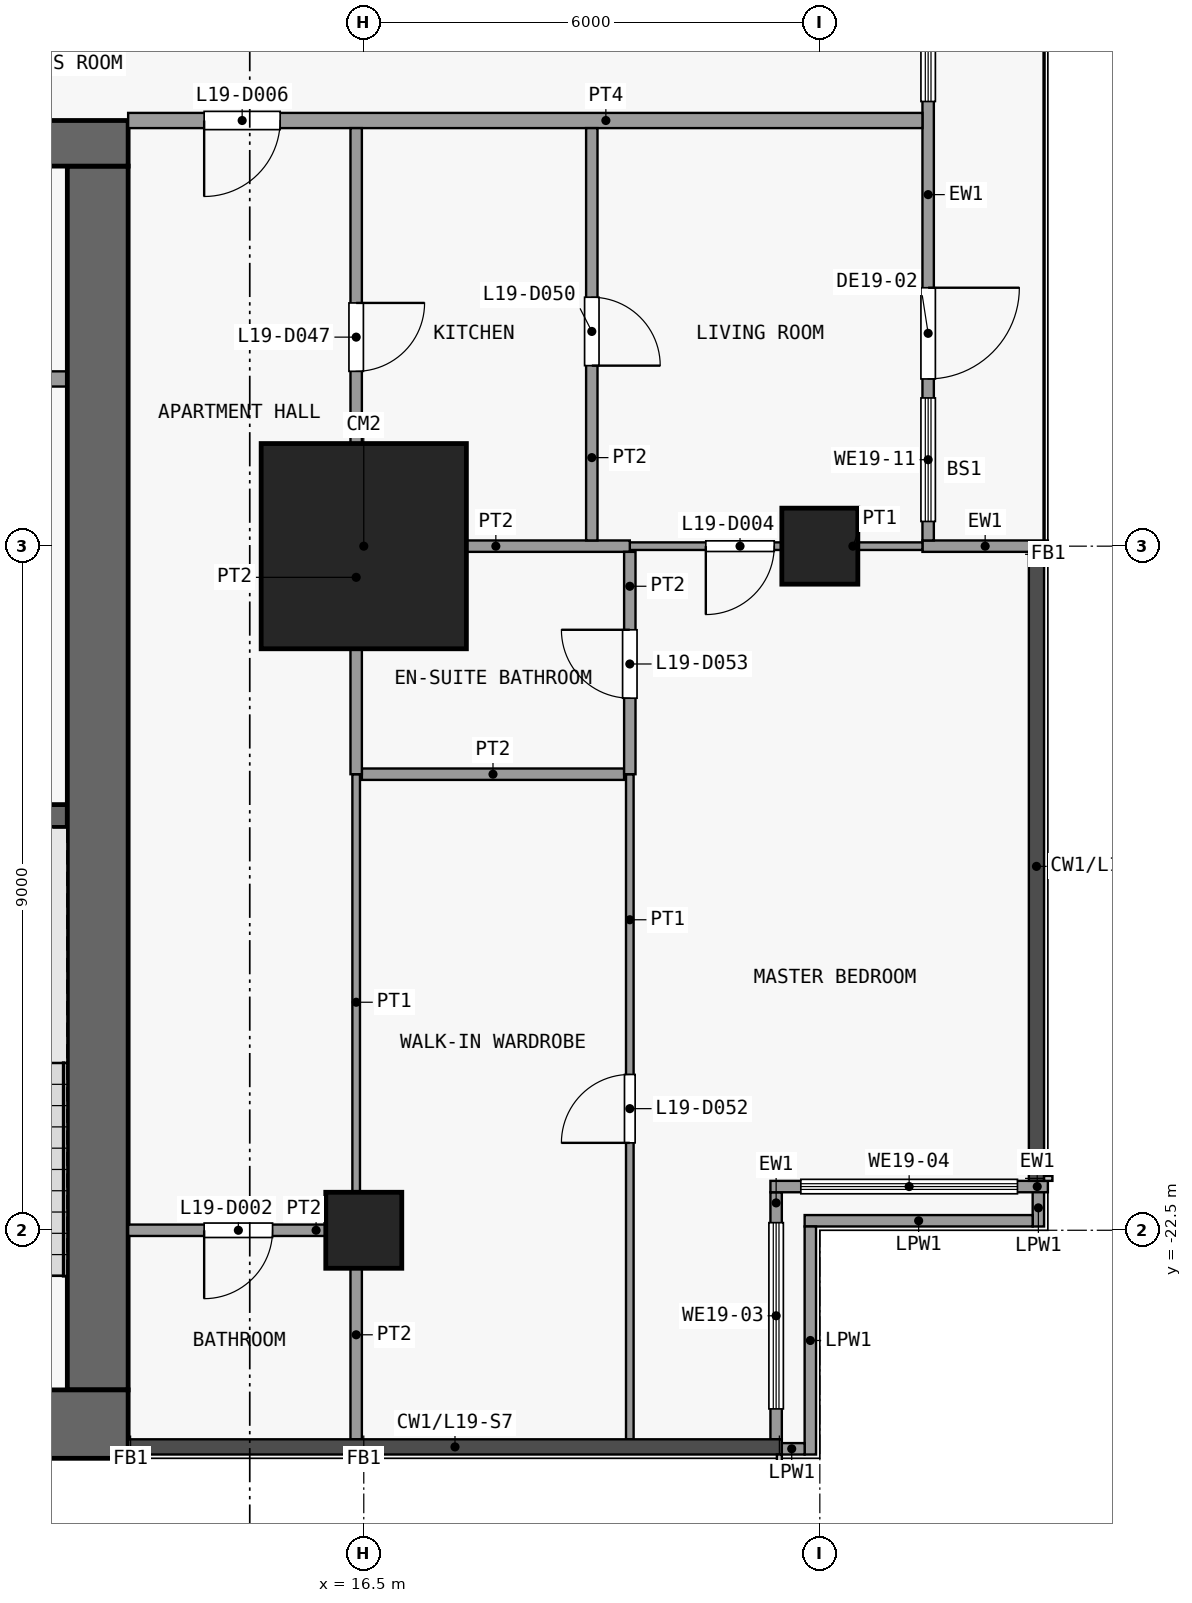
"""IFC4 building model, lengths in metres.
Left out: names, types, materials, properties, quantities, classifications, styles, units other than length and angle.
Written with IfcOpenShell. Run it as: python <this file> out.ifc"""

import sys

from ifc_helpers import new_model, si_unit, direction, frame, frame_2d, origin, origin_2d, place, context, subcontext, project, spatial, rectangle, extrude, element, fill, save


model = new_model("IFC4")
c1 = context("Model", 3, precision=1e-05, world=origin(), true_north=direction((0.0, 1.0)))
c2 = subcontext(c1, "Body", "Model", "MODEL_VIEW")
j1 = project(units=[si_unit("LENGTHUNIT", "METRE"), si_unit("PLANEANGLEUNIT", "RADIAN")], contexts=[c1])
p1 = place(None, origin())
s1 = spatial("IfcSite", under=j1, at=p1, CompositionType="ELEMENT")
p2 = place(p1, origin())
s2 = spatial("IfcBuilding", under=s1, at=p2, CompositionType="ELEMENT")
p3 = place(p2, frame((0.0, 0.0, 81.1)))
s3 = spatial("IfcBuildingStorey", under=s2, at=p3, CompositionType="ELEMENT", Elevation=81.1)
p4 = place(p3, frame((16.5, -22.5, 0.0), z_axis=(0.0, 0.0, 1.0), x_axis=(1.0, 0.0, 0.0)))
e1 = element("IfcColumn", 1, at=p4, inside=s3, PredefinedType="COLUMN", context=c2, shape_type="SweptSolid", body=[
    extrude(rectangle(XDim=1.0, YDim=1.0, at=origin_2d()), origin(), (0.0, 0.0, 1.0), 3.6),
])
p5 = place(p3, frame((16.5, -13.5, 0.0), z_axis=(0.0, 0.0, 1.0), x_axis=(1.0, 0.0, 0.0)))
e2 = element("IfcColumn", 2, at=p5, inside=s3, PredefinedType="COLUMN", context=c2, shape_type="SweptSolid", body=[
    extrude(rectangle(XDim=2.7, YDim=2.7, at=origin_2d()), origin(), (0.0, 0.0, 1.0), 3.6),
])
p6 = place(p3, frame((22.5, -13.5, 0.0), z_axis=(0.0, 0.0, 1.0), x_axis=(1.0, 0.0, 0.0)))
e3 = element("IfcColumn", 3, at=p6, inside=s3, PredefinedType="COLUMN", context=c2, shape_type="SweptSolid", body=[
    extrude(rectangle(XDim=1.0, YDim=1.0, at=origin_2d()), origin(), (0.0, 0.0, 1.0), 3.6),
])
p7 = place(p3, frame((-13.4, -25.05, 0.0), z_axis=(0.0, 0.0, 1.0), x_axis=(1.0, 0.0, 0.0)))
e4 = element("IfcWall", 4, at=p7, inside=s3, PredefinedType="SHEAR", context=c2, shape_type="SweptSolid", body=[
    extrude(rectangle(XDim=26.8, YDim=0.9, at=frame_2d((13.4, 0.0))), origin(), (0.0, 0.0, 1.0), 3.3),
])
p8 = place(p3, frame((-13.4, -8.2, 0.0), z_axis=(0.0, 0.0, 1.0), x_axis=(1.0, 0.0, 0.0)))
e5 = element("IfcWall", 5, at=p8, inside=s3, PredefinedType="SHEAR", context=c2, shape_type="SweptSolid", body=[
    extrude(rectangle(XDim=26.8, YDim=0.6, at=frame_2d((13.4, 0.0))), origin(), (0.0, 0.0, 1.0), 3.3),
])
p9 = place(p8, frame((7.7, 0.0, 0.0)))
e6 = element("IfcOpeningElement", 6, at=p9, cuts=e5, PredefinedType="OPENING", context=c2, shape_type="SweptSolid", body=[
    extrude(rectangle(XDim=1.8, YDim=2.1, at=frame_2d((0.9, 1.05))), frame((0.0, 0.31, 0.0), z_axis=(0.0, -1.0, 0.0), x_axis=(1.0, 0.0, 0.0)), (0.0, 0.0, 1.0), 0.62),
])
p10 = place(p8, frame((17.3, 0.0, 0.0)))
e7 = element("IfcOpeningElement", 7, at=p10, cuts=e5, PredefinedType="OPENING", context=c2, shape_type="SweptSolid", body=[
    extrude(rectangle(XDim=1.8, YDim=2.1, at=frame_2d((0.9, 1.05))), frame((0.0, 0.31, 0.0), z_axis=(0.0, -1.0, 0.0), x_axis=(1.0, 0.0, 0.0)), (0.0, 0.0, 1.0), 0.62),
])
p11 = place(p8, frame((2.625, 0.0, 0.0)))
e8 = element("IfcOpeningElement", 8, at=p11, cuts=e5, PredefinedType="OPENING", context=c2, shape_type="SweptSolid", body=[
    extrude(rectangle(XDim=0.9, YDim=2.1, at=frame_2d((0.45, 1.05))), frame((0.0, 0.31, 0.0), z_axis=(0.0, -1.0, 0.0), x_axis=(1.0, 0.0, 0.0)), (0.0, 0.0, 1.0), 0.62),
])
p12 = place(p8, frame((23.275, 0.0, 0.0)))
e9 = element("IfcOpeningElement", 9, at=p12, cuts=e5, PredefinedType="OPENING", context=c2, shape_type="SweptSolid", body=[
    extrude(rectangle(XDim=0.9, YDim=2.1, at=frame_2d((0.45, 1.05))), frame((0.0, 0.31, 0.0), z_axis=(0.0, -1.0, 0.0), x_axis=(1.0, 0.0, 0.0)), (0.0, 0.0, 1.0), 0.62),
])
p13 = place(p3, frame((13.0, -24.6, 0.0), z_axis=(0.0, 0.0, 1.0), x_axis=(0.0, 1.0, 0.0)))
e10 = element("IfcWall", 10, at=p13, inside=s3, PredefinedType="SHEAR", context=c2, shape_type="SweptSolid", body=[
    extrude(rectangle(XDim=16.1, YDim=0.8, at=frame_2d((8.05, 0.0))), origin(), (0.0, 0.0, 1.0), 3.3),
])
p14 = place(p3, frame((9.5, -17.05, 0.0), z_axis=(0.0, 0.0, 1.0), x_axis=(1.0, 0.0, 0.0)))
e11 = element("IfcWall", 11, at=p14, inside=s3, PredefinedType="SHEAR", context=c2, shape_type="SweptSolid", body=[
    extrude(rectangle(XDim=3.1, YDim=0.3, at=frame_2d((1.55, 0.0))), origin(), (0.0, 0.0, 1.0), 3.3),
])
p15 = place(p3, frame((11.15, -11.3, 0.0), z_axis=(0.0, 0.0, 1.0), x_axis=(1.0, 0.0, 0.0)))
e12 = element("IfcWall", 12, at=p15, inside=s3, PredefinedType="PARTITIONING", context=c2, shape_type="SweptSolid", body=[
    extrude(rectangle(XDim=1.45, YDim=0.2, at=frame_2d((0.725, 0.0))), origin(), (0.0, 0.0, 1.0), 3.3),
])
p16 = place(p3, frame((21.925, -22.0, 0.0), z_axis=(0.0, 0.0, 1.0), x_axis=(0.0, -1.0, 0.0)))
e13 = element("IfcWall", 13, at=p16, inside=s3, PredefinedType="SOLIDWALL", context=c2, shape_type="SweptSolid", body=[
    extrude(rectangle(XDim=3.25, YDim=0.15, at=frame_2d((1.625, 0.0))), origin(), (0.0, 0.0, 1.0), 3.3),
])
p17 = place(p16, frame((0.4, 0.0, 0.9)))
e14 = element("IfcOpeningElement", 14, at=p17, cuts=e13, PredefinedType="OPENING", context=c2, shape_type="SweptSolid", body=[
    extrude(rectangle(XDim=2.45, YDim=2.4, at=frame_2d((1.225, 1.2))), frame((0.0, 0.085, 0.0), z_axis=(0.0, -1.0, 0.0), x_axis=(1.0, 0.0, 0.0)), (0.0, 0.0, 1.0), 0.17),
])
p18 = place(p3, frame((25.5, -21.925, 0.0), z_axis=(0.0, 0.0, 1.0), x_axis=(-1.0, 0.0, 0.0)))
e15 = element("IfcWall", 15, at=p18, inside=s3, PredefinedType="SOLIDWALL", context=c2, shape_type="SweptSolid", body=[
    extrude(rectangle(XDim=3.65, YDim=0.15, at=frame_2d((1.825, 0.0))), origin(), (0.0, 0.0, 1.0), 3.3),
])
p19 = place(p18, frame((0.4, 0.0, 0.9)))
e16 = element("IfcOpeningElement", 16, at=p19, cuts=e15, PredefinedType="OPENING", context=c2, shape_type="SweptSolid", body=[
    extrude(rectangle(XDim=2.85, YDim=2.4, at=frame_2d((1.425, 1.2))), frame((0.0, 0.085, 0.0), z_axis=(0.0, -1.0, 0.0), x_axis=(1.0, 0.0, 0.0)), (0.0, 0.0, 1.0), 0.17),
])
p20 = place(p3, frame((23.85, -13.5, 0.0), z_axis=(0.0, 0.0, 1.0), x_axis=(1.0, 0.0, 0.0)))
e17 = element("IfcWall", 17, at=p20, inside=s3, PredefinedType="SOLIDWALL", context=c2, shape_type="SweptSolid", body=[
    extrude(rectangle(XDim=1.65, YDim=0.15, at=frame_2d((0.825, 0.0))), origin(), (0.0, 0.0, 1.0), 3.3),
])
p21 = place(p3, frame((23.925, -4.5, 0.0), z_axis=(0.0, 0.0, 1.0), x_axis=(0.0, -1.0, 0.0)))
e18 = element("IfcWall", 18, at=p21, inside=s3, PredefinedType="SOLIDWALL", context=c2, shape_type="SweptSolid", body=[
    extrude(rectangle(XDim=8.925, YDim=0.15, at=frame_2d((4.462, 0.0))), origin(), (0.0, 0.0, 1.0), 3.3),
])
p22 = place(p21, frame((5.6, 0.0, 0.0)))
e19 = element("IfcOpeningElement", 19, at=p22, cuts=e18, PredefinedType="OPENING", context=c2, shape_type="SweptSolid", body=[
    extrude(rectangle(XDim=1.2, YDim=2.4, at=frame_2d((0.6, 1.2))), frame((0.0, 0.085, 0.0), z_axis=(0.0, -1.0, 0.0), x_axis=(1.0, 0.0, 0.0)), (0.0, 0.0, 1.0), 0.17),
])
p23 = place(p21, frame((7.05, 0.0, 0.9)))
e20 = element("IfcOpeningElement", 20, at=p23, cuts=e18, PredefinedType="OPENING", context=c2, shape_type="SweptSolid", body=[
    extrude(rectangle(XDim=1.625, YDim=2.1, at=frame_2d((0.812, 1.05))), frame((0.0, 0.085, 0.0), z_axis=(0.0, -1.0, 0.0), x_axis=(1.0, 0.0, 0.0)), (0.0, 0.0, 1.0), 0.17),
])
p24 = place(p21, frame((1.3, 0.0, 0.9)))
e21 = element("IfcOpeningElement", 21, at=p24, cuts=e18, PredefinedType="OPENING", context=c2, shape_type="SweptSolid", body=[
    extrude(rectangle(XDim=1.85, YDim=2.1, at=frame_2d((0.925, 1.05))), frame((0.0, 0.085, 0.0), z_axis=(0.0, -1.0, 0.0), x_axis=(1.0, 0.0, 0.0)), (0.0, 0.0, 1.0), 0.17),
])
p25 = place(p3, frame((25.375, -21.96, 0.0), z_axis=(0.0, 0.0, 1.0), x_axis=(0.0, -1.0, 0.0)))
e22 = element("IfcWall", 22, at=p25, inside=s3, PredefinedType="PARAPET", context=c2, shape_type="SweptSolid", body=[
    extrude(rectangle(XDim=0.49, YDim=0.15, at=frame_2d((0.245, 0.0))), origin(), (0.0, 0.0, 1.0), 1.15),
])
for number, where, z_axis, x_axis in (
    (23, (25.3, -22.375, 0.0), (0.0, 0.0, 1.0), (-1.0, 0.0, 0.0)),
    (24, (22.375, -22.45, 0.0), (0.0, 0.0, 1.0), (0.0, -1.0, 0.0)),
):
    element("IfcWall", number, at=place(p3, frame(where, z_axis=z_axis, x_axis=x_axis)), inside=s3, PredefinedType="PARAPET", context=c2, shape_type="SweptSolid", body=[
        extrude(rectangle(XDim=3.0, YDim=0.15, at=frame_2d((1.5, 0.0))), origin(), (0.0, 0.0, 1.0), 1.15),
    ])
p26 = place(p3, frame((22.3, -25.375, 0.0), z_axis=(0.0, 0.0, 1.0), x_axis=(-1.0, 0.0, 0.0)))
e25 = element("IfcWall", 25, at=p26, inside=s3, PredefinedType="PARAPET", context=c2, shape_type="SweptSolid", body=[
    extrude(rectangle(XDim=0.34, YDim=0.15, at=frame_2d((0.17, 0.0))), origin(), (0.0, 0.0, 1.0), 1.15),
])
p27 = place(p3, frame((13.4, -22.5, 0.0), z_axis=(0.0, 0.0, 1.0), x_axis=(1.0, 0.0, 0.0)))
e26 = element("IfcWall", 26, at=p27, inside=s3, PredefinedType="PARTITIONING", context=c2, shape_type="SweptSolid", body=[
    extrude(rectangle(XDim=2.925, YDim=0.15, at=frame_2d((1.462, 0.0))), origin(), (0.0, 0.0, 1.0), 3.3),
])
p28 = place(p27, frame((1.0, 0.0, 0.0)))
e27 = element("IfcOpeningElement", 27, at=p28, cuts=e26, PredefinedType="OPENING", context=c2, shape_type="SweptSolid", body=[
    extrude(rectangle(XDim=0.9, YDim=2.1, at=frame_2d((0.45, 1.05))), frame((0.0, 0.085, 0.0), z_axis=(0.0, -1.0, 0.0), x_axis=(1.0, 0.0, 0.0)), (0.0, 0.0, 1.0), 0.17),
])
p29 = place(p3, frame((16.475, -16.5, 0.0), z_axis=(0.0, 0.0, 1.0), x_axis=(1.0, 0.0, 0.0)))
e28 = element("IfcWall", 28, at=p29, inside=s3, PredefinedType="PARTITIONING", context=c2, shape_type="SweptSolid", body=[
    extrude(rectangle(XDim=3.45, YDim=0.15, at=frame_2d((1.725, 0.0))), origin(), (0.0, 0.0, 1.0), 3.3),
])
p30 = place(p3, frame((20.0, -13.5, 0.0), z_axis=(0.0, 0.0, 1.0), x_axis=(1.0, 0.0, 0.0)))
e29 = element("IfcWall", 29, at=p30, inside=s3, PredefinedType="PARTITIONING", context=c2, shape_type="SweptSolid", body=[
    extrude(rectangle(XDim=3.85, YDim=0.1, at=frame_2d((1.925, 0.0))), origin(), (0.0, 0.0, 1.0), 3.3),
])
p31 = place(p30, frame((1.0, 0.0, 0.0)))
e30 = element("IfcOpeningElement", 30, at=p31, cuts=e29, PredefinedType="OPENING", context=c2, shape_type="SweptSolid", body=[
    extrude(rectangle(XDim=0.9, YDim=2.1, at=frame_2d((0.45, 1.05))), frame((0.0, 0.06, 0.0), z_axis=(0.0, -1.0, 0.0), x_axis=(1.0, 0.0, 0.0)), (0.0, 0.0, 1.0), 0.12),
])
p32 = place(p3, frame((16.475, -13.5, 0.0), z_axis=(0.0, 0.0, 1.0), x_axis=(1.0, 0.0, 0.0)))
e31 = element("IfcWall", 31, at=p32, inside=s3, PredefinedType="PARTITIONING", context=c2, shape_type="SweptSolid", body=[
    extrude(rectangle(XDim=3.525, YDim=0.15, at=frame_2d((1.762, 0.0))), origin(), (0.0, 0.0, 1.0), 3.3),
])
p33 = place(p3, frame((13.4, -7.9, 0.0), z_axis=(0.0, 0.0, 1.0), x_axis=(1.0, 0.0, 0.0)))
e32 = element("IfcWall", 32, at=p33, inside=s3, PredefinedType="PARTITIONING", context=c2, shape_type="SweptSolid", body=[
    extrude(rectangle(XDim=10.45, YDim=0.2, at=frame_2d((5.225, 0.0))), origin(), (0.0, 0.0, 1.0), 3.3),
])
p34 = place(p33, frame((1.0, 0.0, 0.0)))
e33 = element("IfcOpeningElement", 33, at=p34, cuts=e32, PredefinedType="OPENING", context=c2, shape_type="SweptSolid", body=[
    extrude(rectangle(XDim=1.0, YDim=2.1, at=frame_2d((0.5, 1.05))), frame((0.0, 0.11, 0.0), z_axis=(0.0, -1.0, 0.0), x_axis=(1.0, 0.0, 0.0)), (0.0, 0.0, 1.0), 0.22),
])
p35 = place(p3, frame((16.4, -22.5, 0.0), z_axis=(0.0, 0.0, 1.0), x_axis=(0.0, 1.0, 0.0)))
e34 = element("IfcWall", 34, at=p35, inside=s3, PredefinedType="PARTITIONING", context=c2, shape_type="SweptSolid", body=[
    extrude(rectangle(XDim=6.0, YDim=0.1, at=frame_2d((3.0, 0.0))), origin(), (0.0, 0.0, 1.0), 3.3),
])
p36 = place(p3, frame((16.4, -25.25, 0.0), z_axis=(0.0, 0.0, 1.0), x_axis=(0.0, 1.0, 0.0)))
e35 = element("IfcWall", 35, at=p36, inside=s3, PredefinedType="PARTITIONING", context=c2, shape_type="SweptSolid", body=[
    extrude(rectangle(XDim=2.75, YDim=0.15, at=frame_2d((1.375, 0.0))), origin(), (0.0, 0.0, 1.0), 3.3),
])
p37 = place(p3, frame((16.4, -16.5, 0.0), z_axis=(0.0, 0.0, 1.0), x_axis=(0.0, 1.0, 0.0)))
e36 = element("IfcWall", 36, at=p37, inside=s3, PredefinedType="PARTITIONING", context=c2, shape_type="SweptSolid", body=[
    extrude(rectangle(XDim=8.5, YDim=0.15, at=frame_2d((4.25, 0.0))), origin(), (0.0, 0.0, 1.0), 3.3),
])
p38 = place(p37, frame((5.3, 0.0, 0.0)))
e37 = element("IfcOpeningElement", 37, at=p38, cuts=e36, PredefinedType="OPENING", context=c2, shape_type="SweptSolid", body=[
    extrude(rectangle(XDim=0.9, YDim=2.1, at=frame_2d((0.45, 1.05))), frame((0.0, 0.085, 0.0), z_axis=(0.0, -1.0, 0.0), x_axis=(1.0, 0.0, 0.0)), (0.0, 0.0, 1.0), 0.17),
])
p39 = place(p3, frame((19.5, -13.425, 0.0), z_axis=(0.0, 0.0, 1.0), x_axis=(0.0, 1.0, 0.0)))
e38 = element("IfcWall", 38, at=p39, inside=s3, PredefinedType="PARTITIONING", context=c2, shape_type="SweptSolid", body=[
    extrude(rectangle(XDim=5.425, YDim=0.15, at=frame_2d((2.712, 0.0))), origin(), (0.0, 0.0, 1.0), 3.3),
])
p40 = place(p39, frame((2.3, 0.0, 0.0)))
e39 = element("IfcOpeningElement", 39, at=p40, cuts=e38, PredefinedType="OPENING", context=c2, shape_type="SweptSolid", body=[
    extrude(rectangle(XDim=0.9, YDim=2.1, at=frame_2d((0.45, 1.05))), frame((0.0, 0.085, 0.0), z_axis=(0.0, -1.0, 0.0), x_axis=(1.0, 0.0, 0.0)), (0.0, 0.0, 1.0), 0.17),
])
p41 = place(p3, frame((20.0, -25.25, 0.0), z_axis=(0.0, 0.0, 1.0), x_axis=(0.0, 1.0, 0.0)))
e40 = element("IfcWall", 40, at=p41, inside=s3, PredefinedType="PARTITIONING", context=c2, shape_type="SweptSolid", body=[
    extrude(rectangle(XDim=8.75, YDim=0.1, at=frame_2d((4.375, 0.0))), origin(), (0.0, 0.0, 1.0), 3.3),
])
p42 = place(p41, frame((3.9, 0.0, 0.0)))
e41 = element("IfcOpeningElement", 41, at=p42, cuts=e40, PredefinedType="OPENING", context=c2, shape_type="SweptSolid", body=[
    extrude(rectangle(XDim=0.9, YDim=2.1, at=frame_2d((0.45, 1.05))), frame((0.0, 0.06, 0.0), z_axis=(0.0, -1.0, 0.0), x_axis=(1.0, 0.0, 0.0)), (0.0, 0.0, 1.0), 0.12),
])
p43 = place(p3, frame((20.0, -16.5, 0.0), z_axis=(0.0, 0.0, 1.0), x_axis=(0.0, 1.0, 0.0)))
e42 = element("IfcWall", 42, at=p43, inside=s3, PredefinedType="PARTITIONING", context=c2, shape_type="SweptSolid", body=[
    extrude(rectangle(XDim=2.925, YDim=0.15, at=frame_2d((1.462, 0.0))), origin(), (0.0, 0.0, 1.0), 3.3),
])
p44 = place(p43, frame((1.0, 0.0, 0.0)))
e43 = element("IfcOpeningElement", 43, at=p44, cuts=e42, PredefinedType="OPENING", context=c2, shape_type="SweptSolid", body=[
    extrude(rectangle(XDim=0.9, YDim=2.1, at=frame_2d((0.45, 1.05))), frame((0.0, 0.085, 0.0), z_axis=(0.0, -1.0, 0.0), x_axis=(1.0, 0.0, 0.0)), (0.0, 0.0, 1.0), 0.17),
])
p45 = place(p17, origin())
e44 = element("IfcWindow", 44, at=p45, inside=s3, PartitioningType="SINGLE_PANEL", PredefinedType="WINDOW", context=c2, shape_type="SweptSolid", body=[
    extrude(rectangle(XDim=2.45, YDim=2.4, at=frame_2d((1.225, 1.2))), frame((0.0, 0.03, 0.0), z_axis=(0.0, -1.0, 0.0), x_axis=(1.0, 0.0, 0.0)), (0.0, 0.0, 1.0), 0.06),
])
fill(e14, e44)
p46 = place(p19, origin())
e45 = element("IfcWindow", 45, at=p46, inside=s3, PartitioningType="SINGLE_PANEL", PredefinedType="WINDOW", context=c2, shape_type="SweptSolid", body=[
    extrude(rectangle(XDim=2.85, YDim=2.4, at=frame_2d((1.425, 1.2))), frame((0.0, 0.03, 0.0), z_axis=(0.0, -1.0, 0.0), x_axis=(1.0, 0.0, 0.0)), (0.0, 0.0, 1.0), 0.06),
])
fill(e16, e45)
p47 = place(p22, origin())
e46 = element("IfcDoor", 46, at=p47, inside=s3, OperationType="SINGLE_SWING_LEFT", PredefinedType="DOOR", context=c2, shape_type="SweptSolid", body=[
    extrude(rectangle(XDim=1.2, YDim=2.4, at=frame_2d((0.6, 1.2))), frame((0.0, 0.025, 0.0), z_axis=(0.0, -1.0, 0.0), x_axis=(1.0, 0.0, 0.0)), (0.0, 0.0, 1.0), 0.05),
])
fill(e19, e46)
p48 = place(p23, origin())
e47 = element("IfcWindow", 47, at=p48, inside=s3, PartitioningType="SINGLE_PANEL", PredefinedType="WINDOW", context=c2, shape_type="SweptSolid", body=[
    extrude(rectangle(XDim=1.625, YDim=2.1, at=frame_2d((0.812, 1.05))), frame((0.0, 0.03, 0.0), z_axis=(0.0, -1.0, 0.0), x_axis=(1.0, 0.0, 0.0)), (0.0, 0.0, 1.0), 0.06),
])
fill(e20, e47)
p49 = place(p24, origin())
e48 = element("IfcWindow", 48, at=p49, inside=s3, PartitioningType="SINGLE_PANEL", PredefinedType="WINDOW", context=c2, shape_type="SweptSolid", body=[
    extrude(rectangle(XDim=1.85, YDim=2.1, at=frame_2d((0.925, 1.05))), frame((0.0, 0.03, 0.0), z_axis=(0.0, -1.0, 0.0), x_axis=(1.0, 0.0, 0.0)), (0.0, 0.0, 1.0), 0.06),
])
fill(e21, e48)
p50 = place(p28, origin())
e49 = element("IfcDoor", 49, at=p50, inside=s3, OperationType="SINGLE_SWING_LEFT", PredefinedType="DOOR", context=c2, shape_type="SweptSolid", body=[
    extrude(rectangle(XDim=0.9, YDim=2.1, at=frame_2d((0.45, 1.05))), frame((0.0, 0.025, 0.0), z_axis=(0.0, -1.0, 0.0), x_axis=(1.0, 0.0, 0.0)), (0.0, 0.0, 1.0), 0.05),
])
fill(e27, e49)
p51 = place(p31, origin())
e50 = element("IfcDoor", 50, at=p51, inside=s3, OperationType="SINGLE_SWING_LEFT", PredefinedType="DOOR", context=c2, shape_type="SweptSolid", body=[
    extrude(rectangle(XDim=0.9, YDim=2.1, at=frame_2d((0.45, 1.05))), frame((0.0, 0.025, 0.0), z_axis=(0.0, -1.0, 0.0), x_axis=(1.0, 0.0, 0.0)), (0.0, 0.0, 1.0), 0.05),
])
fill(e30, e50)
p52 = place(p34, origin())
e51 = element("IfcDoor", 51, at=p52, inside=s3, OperationType="SINGLE_SWING_LEFT", PredefinedType="DOOR", context=c2, shape_type="SweptSolid", body=[
    extrude(rectangle(XDim=1.0, YDim=2.1, at=frame_2d((0.5, 1.05))), frame((0.0, 0.025, 0.0), z_axis=(0.0, -1.0, 0.0), x_axis=(1.0, 0.0, 0.0)), (0.0, 0.0, 1.0), 0.05),
])
fill(e33, e51)
p53 = place(p38, origin())
e52 = element("IfcDoor", 52, at=p53, inside=s3, OperationType="SINGLE_SWING_RIGHT", PredefinedType="DOOR", context=c2, shape_type="SweptSolid", body=[
    extrude(rectangle(XDim=0.9, YDim=2.1, at=frame_2d((0.45, 1.05))), frame((0.0, 0.025, 0.0), z_axis=(0.0, -1.0, 0.0), x_axis=(1.0, 0.0, 0.0)), (0.0, 0.0, 1.0), 0.05),
])
fill(e37, e52)
p54 = place(p40, origin())
e53 = element("IfcDoor", 53, at=p54, inside=s3, OperationType="SINGLE_SWING_LEFT", PredefinedType="DOOR", context=c2, shape_type="SweptSolid", body=[
    extrude(rectangle(XDim=0.9, YDim=2.1, at=frame_2d((0.45, 1.05))), frame((0.0, 0.025, 0.0), z_axis=(0.0, -1.0, 0.0), x_axis=(1.0, 0.0, 0.0)), (0.0, 0.0, 1.0), 0.05),
])
fill(e39, e53)
p55 = place(p42, origin())
e54 = element("IfcDoor", 54, at=p55, inside=s3, OperationType="SINGLE_SWING_RIGHT", PredefinedType="DOOR", context=c2, shape_type="SweptSolid", body=[
    extrude(rectangle(XDim=0.9, YDim=2.1, at=frame_2d((0.45, 1.05))), frame((0.0, 0.025, 0.0), z_axis=(0.0, -1.0, 0.0), x_axis=(1.0, 0.0, 0.0)), (0.0, 0.0, 1.0), 0.05),
])
fill(e41, e54)
p56 = place(p44, origin())
e55 = element("IfcDoor", 55, at=p56, inside=s3, OperationType="SINGLE_SWING_LEFT", PredefinedType="DOOR", context=c2, shape_type="SweptSolid", body=[
    extrude(rectangle(XDim=0.9, YDim=2.1, at=frame_2d((0.45, 1.05))), frame((0.0, 0.025, 0.0), z_axis=(0.0, -1.0, 0.0), x_axis=(1.0, 0.0, 0.0)), (0.0, 0.0, 1.0), 0.05),
])
fill(e43, e55)
save(model, sys.argv[1])
